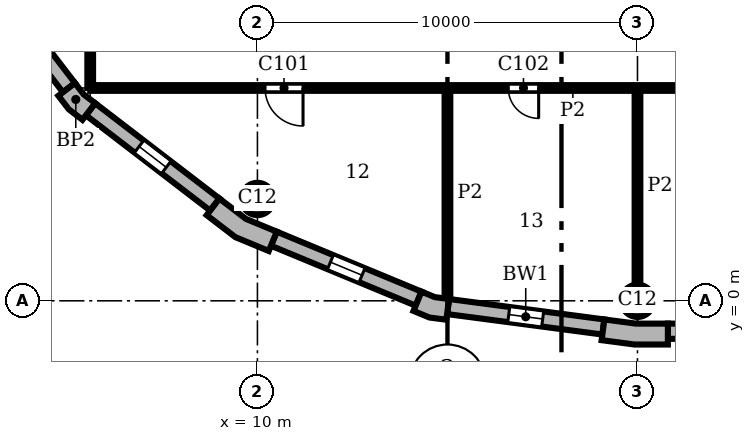
"""IFC4 building model, lengths in metres.
Left out: names, types, materials, properties, quantities, classifications, styles, units other than length and angle.
Written with IfcOpenShell. Run it as: python <this file> out.ifc"""

import sys

from ifc_helpers import new_model, si_unit, direction, frame, frame_2d, origin, origin_2d, place, context, subcontext, project, spatial, polyline, rectangle, circle, outline, extrude, element, fill, save


model = new_model("IFC4")
c1 = context("Model", 3, precision=1e-05, world=origin(), true_north=direction((0.0, 1.0)))
c2 = subcontext(c1, "Body", "Model", "MODEL_VIEW")
j1 = project(units=[si_unit("LENGTHUNIT", "METRE"), si_unit("PLANEANGLEUNIT", "RADIAN")], contexts=[c1])
p1 = place(None, origin())
s1 = spatial("IfcSite", under=j1, at=p1, CompositionType="ELEMENT")
p2 = place(p1, origin())
s2 = spatial("IfcBuilding", under=s1, at=p2, CompositionType="ELEMENT")
p3 = place(p2, frame((0.0, 0.0, 251.4)))
s3 = spatial("IfcBuildingStorey", under=s2, at=p3, CompositionType="ELEMENT", Elevation=251.4)
for number, where, z_axis, x_axis in (
    (1, (20.0, 0.0, 0.0), (0.0, 0.0, 1.0), (1.0, 0.0, 0.0)),
    (2, (10.0, 2.679, 0.0), (0.0, 0.0, 1.0), (1.0, 0.0, 0.0)),
):
    element("IfcColumn", number, at=place(p3, frame(where, z_axis=z_axis, x_axis=x_axis)), inside=s3, PredefinedType="COLUMN", context=c2, shape_type="SweptSolid", body=[
        extrude(circle(Radius=0.425, at=origin_2d()), origin(), (0.0, 0.0, 1.0), 3.9),
    ])
p4 = place(p3, origin())
e3 = element("IfcWall", 3, at=p4, inside=s3, PredefinedType="SOLIDWALL", context=c2, shape_type="SweptSolid", body=[
    extrude(outline(polyline([(19.076, -0.887), (19.057, -1.036), (19.925, -1.15), (20.8, -1.15), (20.8, -1.0), (20.8, -0.6), (19.961, -0.6), (19.128, -0.49), (19.076, -0.887)])), origin(), (0.0, 0.0, 1.0), 3.9),
])
e4 = element("IfcWall", 4, at=p4, inside=s3, PredefinedType="SOLIDWALL", context=c2, shape_type="SweptSolid", body=[
    extrude(outline(polyline([(4.882, 5.487), (4.763, 5.396), (5.038, 5.038), (5.396, 4.763), (5.487, 4.882), (5.731, 5.199), (5.43, 5.43), (5.199, 5.731), (4.882, 5.487)])), origin(), (0.0, 0.0, 1.0), 3.9),
])
e5 = element("IfcWall", 5, at=p4, inside=s3, PredefinedType="SOLIDWALL", context=c2, shape_type="SweptSolid", body=[
    extrude(outline(polyline([(8.757, 2.373), (8.665, 2.254), (9.42, 1.675), (10.299, 1.311), (10.356, 1.449), (10.51, 1.819), (9.698, 2.155), (9.0, 2.69), (8.757, 2.373)])), origin(), (0.0, 0.0, 1.0), 3.9),
])
e6 = element("IfcWall", 6, at=p4, inside=s3, PredefinedType="SOLIDWALL", context=c2, shape_type="SweptSolid", body=[
    extrude(outline(polyline([(14.164, -0.128), (14.106, -0.266), (14.523, -0.439), (14.971, -0.498), (14.99, -0.349), (15.043, 0.047), (14.667, 0.097), (14.317, 0.242), (14.164, -0.128)])), origin(), (0.0, 0.0, 1.0), 3.9),
])
p5 = place(p3, frame((20.8, -0.8, 0.0), z_axis=(0.0, 0.0, 1.0), x_axis=(1.0, 0.0, 0.0)))
e7 = element("IfcWall", 7, at=p5, inside=s3, PredefinedType="SOLIDWALL", context=c2, shape_type="SweptSolid", body=[
    extrude(rectangle(XDim=28.4, YDim=0.4, at=frame_2d((14.2, 0.0))), origin(), (0.0, 0.0, 1.0), 3.9),
])
p6 = place(p5, frame((3.75, 0.0, 0.9)))
e8 = element("IfcOpeningElement", 8, at=p6, cuts=e7, PredefinedType="OPENING", context=c2, shape_type="SweptSolid", body=[
    extrude(rectangle(XDim=0.9, YDim=2.35, at=frame_2d((0.45, 1.175))), frame((0.0, 0.21, 0.0), z_axis=(0.0, -1.0, 0.0), x_axis=(1.0, 0.0, 0.0)), (0.0, 0.0, 1.0), 0.42),
])
p7 = place(p5, frame((13.75, 0.0, 0.9)))
e9 = element("IfcOpeningElement", 9, at=p7, cuts=e7, PredefinedType="OPENING", context=c2, shape_type="SweptSolid", body=[
    extrude(rectangle(XDim=0.9, YDim=2.35, at=frame_2d((0.45, 1.175))), frame((0.0, 0.21, 0.0), z_axis=(0.0, -1.0, 0.0), x_axis=(1.0, 0.0, 0.0)), (0.0, 0.0, 1.0), 0.42),
])
p8 = place(p5, frame((23.75, 0.0, 0.9)))
e10 = element("IfcOpeningElement", 10, at=p8, cuts=e7, PredefinedType="OPENING", context=c2, shape_type="SweptSolid", body=[
    extrude(rectangle(XDim=0.9, YDim=2.35, at=frame_2d((0.45, 1.175))), frame((0.0, 0.21, 0.0), z_axis=(0.0, -1.0, 0.0), x_axis=(1.0, 0.0, 0.0)), (0.0, 0.0, 1.0), 0.42),
])
p9 = place(p3, frame((2.532, 8.878, 0.0), z_axis=(0.0, 0.0, 1.0), x_axis=(0.608759824817, -0.793354571229, 0.0)))
e11 = element("IfcWall", 11, at=p9, inside=s3, PredefinedType="SOLIDWALL", context=c2, shape_type="SweptSolid", body=[
    extrude(rectangle(XDim=4.121, YDim=0.4, at=frame_2d((2.061, 0.0))), origin(), (0.0, 0.0, 1.0), 3.9),
])
p10 = place(p9, frame((1.611, 0.0, 0.9)))
e12 = element("IfcOpeningElement", 12, at=p10, cuts=e11, PredefinedType="OPENING", context=c2, shape_type="SweptSolid", body=[
    extrude(rectangle(XDim=0.9, YDim=2.35, at=frame_2d((0.45, 1.175))), frame((0.0, 0.21, 0.0), z_axis=(0.0, -1.0, 0.0), x_axis=(1.0, 0.0, 0.0)), (0.0, 0.0, 1.0), 0.42),
])
p11 = place(p3, frame((5.609, 5.041, 0.0), z_axis=(0.0, 0.0, 1.0), x_axis=(0.793354571229, -0.608759824817, 0.0)))
e13 = element("IfcWall", 13, at=p11, inside=s3, PredefinedType="SOLIDWALL", context=c2, shape_type="SweptSolid", body=[
    extrude(rectangle(XDim=4.121, YDim=0.4, at=frame_2d((2.061, 0.0))), origin(), (0.0, 0.0, 1.0), 3.9),
])
p12 = place(p11, frame((1.611, 0.0, 0.9)))
e14 = element("IfcOpeningElement", 14, at=p12, cuts=e13, PredefinedType="OPENING", context=c2, shape_type="SweptSolid", body=[
    extrude(rectangle(XDim=0.9, YDim=2.35, at=frame_2d((0.45, 1.175))), frame((0.0, 0.21, 0.0), z_axis=(0.0, -1.0, 0.0), x_axis=(1.0, 0.0, 0.0)), (0.0, 0.0, 1.0), 0.42),
])
p13 = place(p3, frame((10.433, 1.634, 0.0), z_axis=(0.0, 0.0, 1.0), x_axis=(0.923863744394, -0.382721546029, 0.0)))
e15 = element("IfcWall", 15, at=p13, inside=s3, PredefinedType="SOLIDWALL", context=c2, shape_type="SweptSolid", body=[
    extrude(rectangle(XDim=4.121, YDim=0.4, at=frame_2d((2.061, 0.0))), origin(), (0.0, 0.0, 1.0), 3.9),
])
p14 = place(p13, frame((1.611, 0.0, 0.9)))
e16 = element("IfcOpeningElement", 16, at=p14, cuts=e15, PredefinedType="OPENING", context=c2, shape_type="SweptSolid", body=[
    extrude(rectangle(XDim=0.9, YDim=2.35, at=frame_2d((0.45, 1.175))), frame((0.0, 0.21, 0.0), z_axis=(0.0, -1.0, 0.0), x_axis=(1.0, 0.0, 0.0)), (0.0, 0.0, 1.0), 0.42),
])
p15 = place(p3, frame((15.017, -0.151, 0.0), z_axis=(0.0, 0.0, 1.0), x_axis=(0.991446429508, -0.130514280502, 0.0)))
e17 = element("IfcWall", 17, at=p15, inside=s3, PredefinedType="SOLIDWALL", context=c2, shape_type="SweptSolid", body=[
    extrude(rectangle(XDim=4.121, YDim=0.4, at=frame_2d((2.061, 0.0))), origin(), (0.0, 0.0, 1.0), 3.9),
])
p16 = place(p15, frame((1.611, 0.0, 0.9)))
e18 = element("IfcOpeningElement", 18, at=p16, cuts=e17, PredefinedType="OPENING", context=c2, shape_type="SweptSolid", body=[
    extrude(rectangle(XDim=0.9, YDim=2.35, at=frame_2d((0.45, 1.175))), frame((0.0, 0.21, 0.0), z_axis=(0.0, -1.0, 0.0), x_axis=(1.0, 0.0, 0.0)), (0.0, 0.0, 1.0), 0.42),
])
p17 = place(p3, frame((5.6, 5.6, 0.0), z_axis=(0.0, 0.0, 1.0), x_axis=(0.0, 1.0, 0.0)))
e19 = element("IfcWall", 19, at=p17, inside=s3, PredefinedType="PARTITIONING", context=c2, shape_type="SweptSolid", body=[
    extrude(rectangle(XDim=22.4, YDim=0.15, at=frame_2d((11.2, 0.0))), origin(), (0.0, 0.0, 1.0), 3.58),
])
p18 = place(p17, frame((12.85, 0.0, 0.0)))
e20 = element("IfcOpeningElement", 20, at=p18, cuts=e19, PredefinedType="OPENING", context=c2, shape_type="SweptSolid", body=[
    extrude(rectangle(XDim=1.8, YDim=2.1, at=frame_2d((0.9, 1.05))), frame((0.0, 0.085, 0.0), z_axis=(0.0, -1.0, 0.0), x_axis=(1.0, 0.0, 0.0)), (0.0, 0.0, 1.0), 0.17),
])
p19 = place(p3, frame((15.0, 0.063, 0.0), z_axis=(0.0, 0.0, 1.0), x_axis=(0.0, 1.0, 0.0)))
e21 = element("IfcWall", 21, at=p19, inside=s3, PredefinedType="PARTITIONING", context=c2, shape_type="SweptSolid", body=[
    extrude(rectangle(XDim=5.537, YDim=0.15, at=frame_2d((2.769, 0.0))), origin(), (0.0, 0.0, 1.0), 3.58),
])
p20 = place(p3, frame((20.0, 0.425, 0.0), z_axis=(0.0, 0.0, 1.0), x_axis=(0.0, 1.0, 0.0)))
e22 = element("IfcWall", 22, at=p20, inside=s3, PredefinedType="PARTITIONING", context=c2, shape_type="SweptSolid", body=[
    extrude(rectangle(XDim=5.175, YDim=0.15, at=frame_2d((2.587, 0.0))), origin(), (0.0, 0.0, 1.0), 3.58),
])
p21 = place(p3, frame((5.6, 5.6, 0.0), z_axis=(0.0, 0.0, 1.0), x_axis=(1.0, 0.0, 0.0)))
e23 = element("IfcWall", 23, at=p21, inside=s3, PredefinedType="PARTITIONING", context=c2, shape_type="SweptSolid", body=[
    extrude(rectangle(XDim=25.4, YDim=0.15, at=frame_2d((12.7, 0.0))), origin(), (0.0, 0.0, 1.0), 3.58),
])
p22 = place(p21, frame((4.6, 0.0, 0.0)))
e24 = element("IfcOpeningElement", 24, at=p22, cuts=e23, PredefinedType="OPENING", context=c2, shape_type="SweptSolid", body=[
    extrude(rectangle(XDim=1.0, YDim=2.1, at=frame_2d((0.5, 1.05))), frame((0.0, 0.085, 0.0), z_axis=(0.0, -1.0, 0.0), x_axis=(1.0, 0.0, 0.0)), (0.0, 0.0, 1.0), 0.17),
])
p23 = place(p21, frame((11.0, 0.0, 0.0)))
e25 = element("IfcOpeningElement", 25, at=p23, cuts=e23, PredefinedType="OPENING", context=c2, shape_type="SweptSolid", body=[
    extrude(rectangle(XDim=0.8, YDim=2.1, at=frame_2d((0.4, 1.05))), frame((0.0, 0.085, 0.0), z_axis=(0.0, -1.0, 0.0), x_axis=(1.0, 0.0, 0.0)), (0.0, 0.0, 1.0), 0.17),
])
p24 = place(p21, frame((17.0, 0.0, 0.0)))
e26 = element("IfcOpeningElement", 26, at=p24, cuts=e23, PredefinedType="OPENING", context=c2, shape_type="SweptSolid", body=[
    extrude(rectangle(XDim=1.0, YDim=2.1, at=frame_2d((0.5, 1.05))), frame((0.0, 0.085, 0.0), z_axis=(0.0, -1.0, 0.0), x_axis=(1.0, 0.0, 0.0)), (0.0, 0.0, 1.0), 0.17),
])
p25 = place(p21, frame((23.25, 0.0, 0.0)))
e27 = element("IfcOpeningElement", 27, at=p25, cuts=e23, PredefinedType="OPENING", context=c2, shape_type="SweptSolid", body=[
    extrude(rectangle(XDim=1.0, YDim=2.1, at=frame_2d((0.5, 1.05))), frame((0.0, 0.085, 0.0), z_axis=(0.0, -1.0, 0.0), x_axis=(1.0, 0.0, 0.0)), (0.0, 0.0, 1.0), 0.17),
])
p26 = place(p12, origin())
e28 = element("IfcWindow", 28, at=p26, inside=s3, PartitioningType="SINGLE_PANEL", PredefinedType="WINDOW", context=c2, shape_type="SweptSolid", body=[
    extrude(rectangle(XDim=0.9, YDim=2.35, at=frame_2d((0.45, 1.175))), frame((0.0, 0.16, 0.0), z_axis=(0.0, -1.0, 0.0), x_axis=(1.0, 0.0, 0.0)), (0.0, 0.0, 1.0), 0.06),
])
fill(e14, e28)
p27 = place(p14, origin())
e29 = element("IfcWindow", 29, at=p27, inside=s3, PartitioningType="SINGLE_PANEL", PredefinedType="WINDOW", context=c2, shape_type="SweptSolid", body=[
    extrude(rectangle(XDim=0.9, YDim=2.35, at=frame_2d((0.45, 1.175))), frame((0.0, 0.16, 0.0), z_axis=(0.0, -1.0, 0.0), x_axis=(1.0, 0.0, 0.0)), (0.0, 0.0, 1.0), 0.06),
])
fill(e16, e29)
p28 = place(p16, origin())
e30 = element("IfcWindow", 30, at=p28, inside=s3, PartitioningType="SINGLE_PANEL", PredefinedType="WINDOW", context=c2, shape_type="SweptSolid", body=[
    extrude(rectangle(XDim=0.9, YDim=2.35, at=frame_2d((0.45, 1.175))), frame((0.0, 0.16, 0.0), z_axis=(0.0, -1.0, 0.0), x_axis=(1.0, 0.0, 0.0)), (0.0, 0.0, 1.0), 0.06),
])
fill(e18, e30)
p29 = place(p22, frame((1.0, 0.0, 0.0), z_axis=(0.0, 0.0, 1.0), x_axis=(-1.0, 0.0, 0.0)))
e31 = element("IfcDoor", 31, at=p29, inside=s3, OperationType="SINGLE_SWING_LEFT", PredefinedType="DOOR", context=c2, shape_type="SweptSolid", body=[
    extrude(rectangle(XDim=1.0, YDim=2.1, at=frame_2d((0.5, 1.05))), frame((0.0, 0.025, 0.0), z_axis=(0.0, -1.0, 0.0), x_axis=(1.0, 0.0, 0.0)), (0.0, 0.0, 1.0), 0.05),
])
fill(e24, e31)
p30 = place(p23, frame((0.8, 0.0, 0.0), z_axis=(0.0, 0.0, 1.0), x_axis=(-1.0, 0.0, 0.0)))
e32 = element("IfcDoor", 32, at=p30, inside=s3, OperationType="SINGLE_SWING_LEFT", PredefinedType="DOOR", context=c2, shape_type="SweptSolid", body=[
    extrude(rectangle(XDim=0.8, YDim=2.1, at=frame_2d((0.4, 1.05))), frame((0.0, 0.025, 0.0), z_axis=(0.0, -1.0, 0.0), x_axis=(1.0, 0.0, 0.0)), (0.0, 0.0, 1.0), 0.05),
])
fill(e25, e32)
save(model, sys.argv[1])
